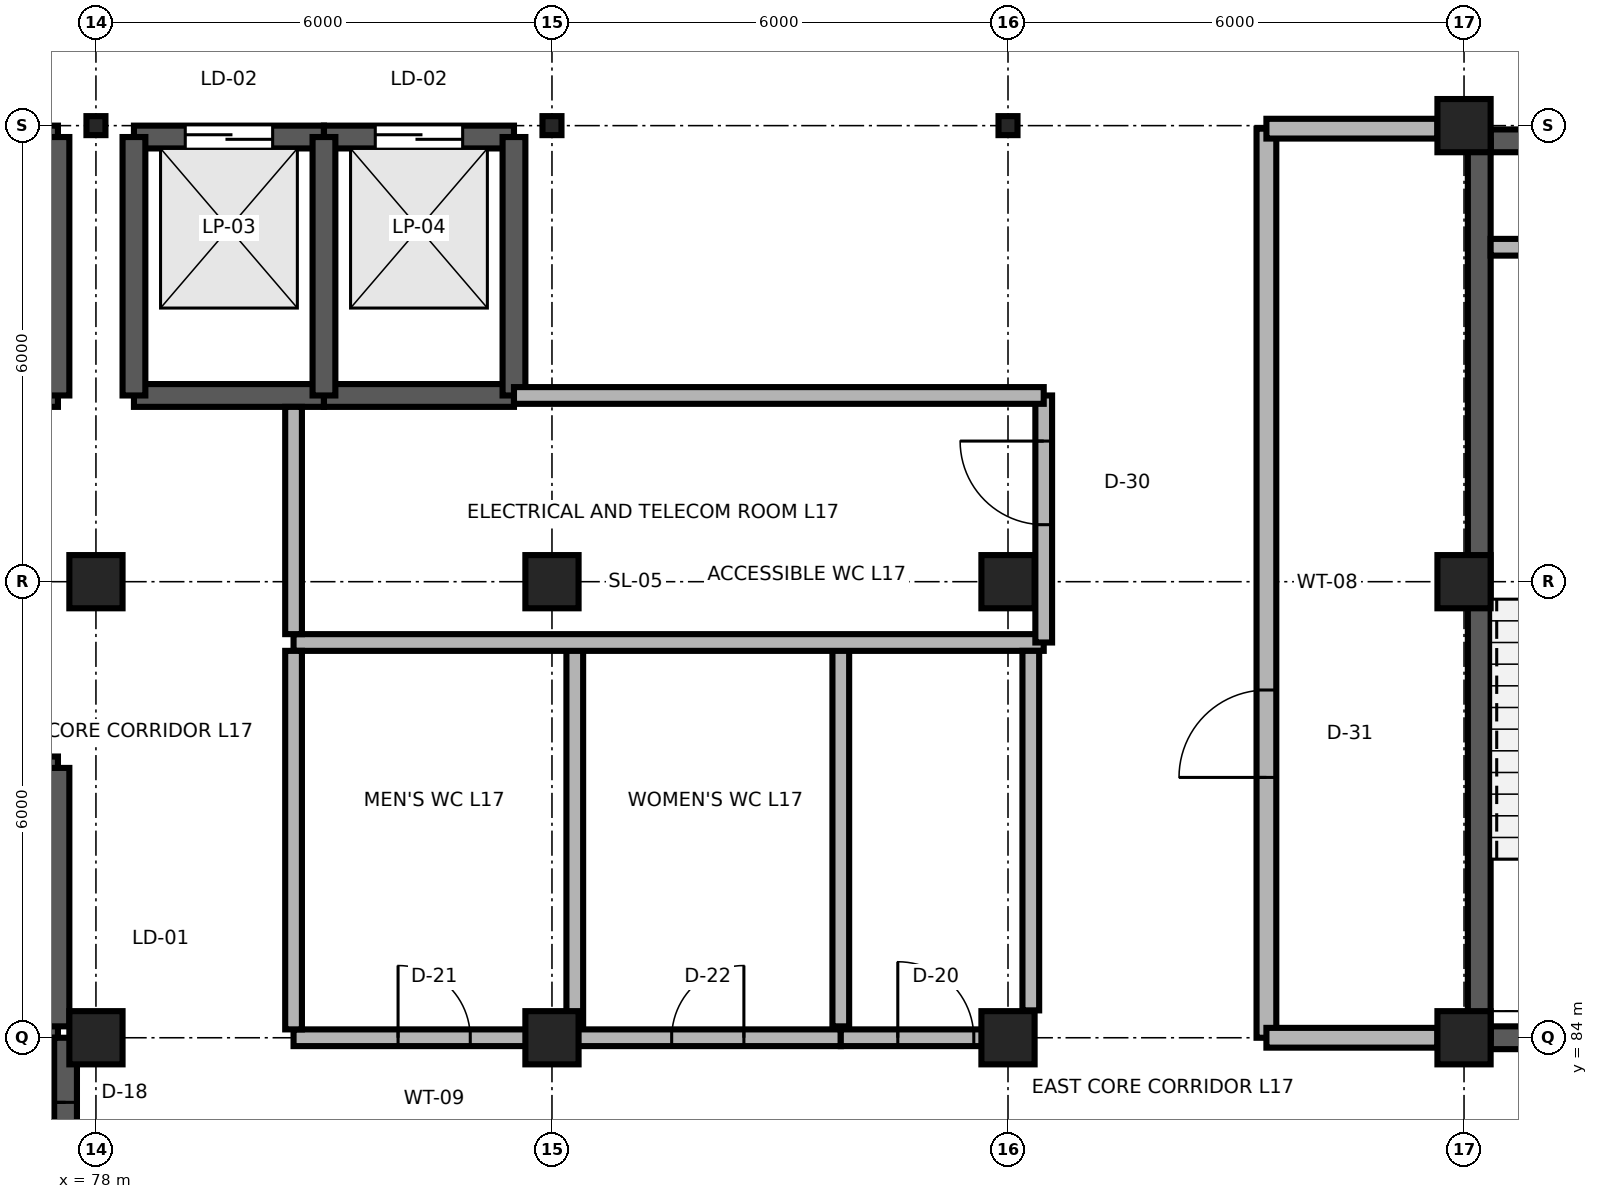
"""IFC4 building model, lengths in metres.
Left out: names, types, materials, properties, quantities, classifications, styles, units other than length and angle.
Written with IfcOpenShell. Run it as: python <this file> out.ifc"""

import sys

from ifc_helpers import new_model, si_unit, direction, frame, frame_2d, origin, origin_2d, place, context, subcontext, project, spatial, rectangle, i_section, extrude, element, fill, save


model = new_model("IFC4")
c1 = context("Model", 3, precision=1e-05, world=origin(), true_north=direction((0.0, 1.0)))
c2 = subcontext(c1, "Body", "Model", "MODEL_VIEW")
j1 = project(units=[si_unit("LENGTHUNIT", "METRE"), si_unit("PLANEANGLEUNIT", "RADIAN")], contexts=[c1])
p1 = place(None, origin())
s1 = spatial("IfcSite", under=j1, at=p1, CompositionType="ELEMENT")
p2 = place(p1, origin())
s2 = spatial("IfcBuilding", under=s1, at=p2, CompositionType="ELEMENT")
p3 = place(p2, frame((0.0, 0.0, 67.8)))
s3 = spatial("IfcBuildingStorey", under=s2, at=p3, CompositionType="ELEMENT", Elevation=67.8)
for number, where, z_axis, x_axis in (
    (1, (78.0, 84.0, 0.0), (0.0, 0.0, 1.0), (1.0, 0.0, 0.0)),
    (2, (84.0, 84.0, 0.0), (0.0, 0.0, 1.0), (1.0, 0.0, 0.0)),
    (3, (90.0, 84.0, 0.0), (0.0, 0.0, 1.0), (1.0, 0.0, 0.0)),
    (4, (96.0, 84.0, 0.0), (0.0, 0.0, 1.0), (1.0, 0.0, 0.0)),
    (5, (78.0, 90.0, 0.0), (0.0, 0.0, 1.0), (1.0, 0.0, 0.0)),
    (6, (84.0, 90.0, 0.0), (0.0, 0.0, 1.0), (1.0, 0.0, 0.0)),
    (7, (90.0, 90.0, 0.0), (0.0, 0.0, 1.0), (1.0, 0.0, 0.0)),
    (8, (96.0, 90.0, 0.0), (0.0, 0.0, 1.0), (1.0, 0.0, 0.0)),
):
    element("IfcColumn", number, at=place(p3, frame(where, z_axis=z_axis, x_axis=x_axis)), inside=s3, PredefinedType="COLUMN", context=c2, shape_type="SweptSolid", body=[
        extrude(rectangle(XDim=0.7, YDim=0.7, at=origin_2d()), origin(), (0.0, 0.0, 1.0), 4.2),
    ])
for number, where, z_axis, x_axis in (
    (9, (78.0, 96.0, 0.0), (0.0, 0.0, 1.0), (1.0, 0.0, 0.0)),
    (10, (84.0, 96.0, 0.0), (0.0, 0.0, 1.0), (1.0, 0.0, 0.0)),
    (11, (90.0, 96.0, 0.0), (0.0, 0.0, 1.0), (1.0, 0.0, 0.0)),
):
    element("IfcColumn", number, at=place(p3, frame(where, z_axis=z_axis, x_axis=x_axis)), inside=s3, PredefinedType="COLUMN", context=c2, shape_type="SweptSolid", body=[
        extrude(i_section(OverallWidth=0.25, OverallDepth=0.25, WebThickness=0.009, FlangeThickness=0.014, FilletRadius=0.016, at=origin_2d()), origin(), (0.0, 0.0, 1.0), 4.2),
    ])
p4 = place(p3, frame((96.0, 96.0, 0.0), z_axis=(0.0, 0.0, 1.0), x_axis=(1.0, 0.0, 0.0)))
e12 = element("IfcColumn", 12, at=p4, inside=s3, PredefinedType="COLUMN", context=c2, shape_type="SweptSolid", body=[
    extrude(rectangle(XDim=0.7, YDim=0.7, at=origin_2d()), origin(), (0.0, 0.0, 1.0), 4.2),
])
p5 = place(p3, frame((96.35, 84.0, 0.0), z_axis=(0.0, 0.0, 1.0), x_axis=(1.0, 0.0, 0.0)))
e13 = element("IfcWall", 13, at=p5, inside=s3, PredefinedType="SHEAR", context=c2, shape_type="SweptSolid", body=[
    extrude(rectangle(XDim=5.3, YDim=0.3, at=frame_2d((2.65, 0.0))), origin(), (0.0, 0.0, 1.0), 3.96),
])
p6 = place(p5, frame((1.975, 0.0, 0.0)))
e14 = element("IfcOpeningElement", 14, at=p6, cuts=e13, PredefinedType="OPENING", context=c2, shape_type="SweptSolid", body=[
    extrude(rectangle(XDim=1.35, YDim=2.2, at=frame_2d((0.675, 1.1))), frame((0.0, 0.165, 0.0), z_axis=(0.0, -1.0, 0.0), x_axis=(1.0, 0.0, 0.0)), (0.0, 0.0, 1.0), 0.33),
])
p7 = place(p3, frame((96.35, 95.8, 0.0), z_axis=(0.0, 0.0, 1.0), x_axis=(1.0, 0.0, 0.0)))
e15 = element("IfcWall", 15, at=p7, inside=s3, PredefinedType="SHEAR", context=c2, shape_type="SweptSolid", body=[
    extrude(rectangle(XDim=5.3, YDim=0.3, at=frame_2d((2.65, 0.0))), origin(), (0.0, 0.0, 1.0), 3.96),
])
p8 = place(p3, frame((96.2, 84.0, 0.0), z_axis=(0.0, 0.0, 1.0), x_axis=(0.0, 1.0, 0.0)))
e16 = element("IfcWall", 16, at=p8, inside=s3, PredefinedType="SHEAR", context=c2, shape_type="SweptSolid", body=[
    extrude(rectangle(XDim=11.8, YDim=0.3, at=frame_2d((5.9, 0.0))), origin(), (0.0, 0.0, 1.0), 3.96),
])
p9 = place(p3, frame((96.35, 94.4, 0.0), z_axis=(0.0, 0.0, 1.0), x_axis=(1.0, 0.0, 0.0)))
e17 = element("IfcWall", 17, at=p9, inside=s3, PredefinedType="PARTITIONING", context=c2, shape_type="SweptSolid", body=[
    extrude(rectangle(XDim=1.1, YDim=0.22, at=frame_2d((0.55, 0.0))), origin(), (0.0, 0.0, 1.0), 3.96),
])
p10 = place(p3, frame((75.0, 84.15, 0.0), z_axis=(0.0, 0.0, 1.0), x_axis=(1.0, 0.0, 0.0)))
e18 = element("IfcWall", 18, at=p10, inside=s3, PredefinedType="SHEAR", context=c2, shape_type="SweptSolid", body=[
    extrude(rectangle(XDim=2.5, YDim=0.3, at=frame_2d((1.25, 0.0))), origin(), (0.0, 0.0, 1.0), 3.96),
])
p11 = place(p10, frame((0.7, 0.0, 0.0)))
e19 = element("IfcOpeningElement", 19, at=p11, cuts=e18, PredefinedType="OPENING", context=c2, shape_type="SweptSolid", body=[
    extrude(rectangle(XDim=1.1, YDim=2.1, at=frame_2d((0.55, 1.05))), frame((0.0, 0.165, 0.0), z_axis=(0.0, -1.0, 0.0), x_axis=(1.0, 0.0, 0.0)), (0.0, 0.0, 1.0), 0.33),
])
p12 = place(p3, frame((75.0, 87.55, 0.0), z_axis=(0.0, 0.0, 1.0), x_axis=(1.0, 0.0, 0.0)))
e20 = element("IfcWall", 20, at=p12, inside=s3, PredefinedType="SHEAR", context=c2, shape_type="SweptSolid", body=[
    extrude(rectangle(XDim=2.5, YDim=0.3, at=frame_2d((1.25, 0.0))), origin(), (0.0, 0.0, 1.0), 3.96),
])
p13 = place(p3, frame((77.5, 84.15, 0.0), z_axis=(0.0, 0.0, 1.0), x_axis=(0.0, 1.0, 0.0)))
e21 = element("IfcWall", 21, at=p13, inside=s3, PredefinedType="SHEAR", context=c2, shape_type="SweptSolid", body=[
    extrude(rectangle(XDim=3.4, YDim=0.3, at=frame_2d((1.7, 0.0))), origin(), (0.0, 0.0, 1.0), 3.96),
])
p14 = place(p3, frame((75.0, 95.85, 0.0), z_axis=(0.0, 0.0, 1.0), x_axis=(1.0, 0.0, 0.0)))
e22 = element("IfcWall", 22, at=p14, inside=s3, PredefinedType="SHEAR", context=c2, shape_type="SweptSolid", body=[
    extrude(rectangle(XDim=2.5, YDim=0.3, at=frame_2d((1.25, 0.0))), origin(), (0.0, 0.0, 1.0), 3.96),
])
p15 = place(p14, frame((0.675, 0.0, 0.0)))
e23 = element("IfcOpeningElement", 23, at=p15, cuts=e22, PredefinedType="OPENING", context=c2, shape_type="SweptSolid", body=[
    extrude(rectangle(XDim=1.15, YDim=2.15, at=frame_2d((0.575, 1.075))), frame((0.0, 0.165, 0.0), z_axis=(0.0, -1.0, 0.0), x_axis=(1.0, 0.0, 0.0)), (0.0, 0.0, 1.0), 0.33),
])
p16 = place(p3, frame((75.0, 92.45, 0.0), z_axis=(0.0, 0.0, 1.0), x_axis=(1.0, 0.0, 0.0)))
e24 = element("IfcWall", 24, at=p16, inside=s3, PredefinedType="SHEAR", context=c2, shape_type="SweptSolid", body=[
    extrude(rectangle(XDim=2.5, YDim=0.3, at=frame_2d((1.25, 0.0))), origin(), (0.0, 0.0, 1.0), 3.96),
])
p17 = place(p3, frame((77.5, 92.45, 0.0), z_axis=(0.0, 0.0, 1.0), x_axis=(0.0, 1.0, 0.0)))
e25 = element("IfcWall", 25, at=p17, inside=s3, PredefinedType="SHEAR", context=c2, shape_type="SweptSolid", body=[
    extrude(rectangle(XDim=3.4, YDim=0.3, at=frame_2d((1.7, 0.0))), origin(), (0.0, 0.0, 1.0), 3.96),
])
p18 = place(p3, frame((78.5, 95.85, 0.0), z_axis=(0.0, 0.0, 1.0), x_axis=(1.0, 0.0, 0.0)))
e26 = element("IfcWall", 26, at=p18, inside=s3, PredefinedType="SHEAR", context=c2, shape_type="SweptSolid", body=[
    extrude(rectangle(XDim=2.5, YDim=0.3, at=frame_2d((1.25, 0.0))), origin(), (0.0, 0.0, 1.0), 3.96),
])
p19 = place(p18, frame((0.675, 0.0, 0.0)))
e27 = element("IfcOpeningElement", 27, at=p19, cuts=e26, PredefinedType="OPENING", context=c2, shape_type="SweptSolid", body=[
    extrude(rectangle(XDim=1.15, YDim=2.15, at=frame_2d((0.575, 1.075))), frame((0.0, 0.165, 0.0), z_axis=(0.0, -1.0, 0.0), x_axis=(1.0, 0.0, 0.0)), (0.0, 0.0, 1.0), 0.33),
])
p20 = place(p3, frame((78.5, 92.45, 0.0), z_axis=(0.0, 0.0, 1.0), x_axis=(1.0, 0.0, 0.0)))
e28 = element("IfcWall", 28, at=p20, inside=s3, PredefinedType="SHEAR", context=c2, shape_type="SweptSolid", body=[
    extrude(rectangle(XDim=2.5, YDim=0.3, at=frame_2d((1.25, 0.0))), origin(), (0.0, 0.0, 1.0), 3.96),
])
p21 = place(p3, frame((78.5, 92.45, 0.0), z_axis=(0.0, 0.0, 1.0), x_axis=(0.0, 1.0, 0.0)))
e29 = element("IfcWall", 29, at=p21, inside=s3, PredefinedType="SHEAR", context=c2, shape_type="SweptSolid", body=[
    extrude(rectangle(XDim=3.4, YDim=0.3, at=frame_2d((1.7, 0.0))), origin(), (0.0, 0.0, 1.0), 3.96),
])
p22 = place(p3, frame((81.0, 95.85, 0.0), z_axis=(0.0, 0.0, 1.0), x_axis=(1.0, 0.0, 0.0)))
e30 = element("IfcWall", 30, at=p22, inside=s3, PredefinedType="SHEAR", context=c2, shape_type="SweptSolid", body=[
    extrude(rectangle(XDim=2.5, YDim=0.3, at=frame_2d((1.25, 0.0))), origin(), (0.0, 0.0, 1.0), 3.96),
])
p23 = place(p22, frame((0.675, 0.0, 0.0)))
e31 = element("IfcOpeningElement", 31, at=p23, cuts=e30, PredefinedType="OPENING", context=c2, shape_type="SweptSolid", body=[
    extrude(rectangle(XDim=1.15, YDim=2.15, at=frame_2d((0.575, 1.075))), frame((0.0, 0.165, 0.0), z_axis=(0.0, -1.0, 0.0), x_axis=(1.0, 0.0, 0.0)), (0.0, 0.0, 1.0), 0.33),
])
p24 = place(p3, frame((81.0, 92.45, 0.0), z_axis=(0.0, 0.0, 1.0), x_axis=(1.0, 0.0, 0.0)))
e32 = element("IfcWall", 32, at=p24, inside=s3, PredefinedType="SHEAR", context=c2, shape_type="SweptSolid", body=[
    extrude(rectangle(XDim=2.5, YDim=0.3, at=frame_2d((1.25, 0.0))), origin(), (0.0, 0.0, 1.0), 3.96),
])
for number, where, z_axis, x_axis in (
    (33, (81.0, 92.45, 0.0), (0.0, 0.0, 1.0), (0.0, 1.0, 0.0)),
    (34, (83.5, 92.45, 0.0), (0.0, 0.0, 1.0), (0.0, 1.0, 0.0)),
):
    element("IfcWall", number, at=place(p3, frame(where, z_axis=z_axis, x_axis=x_axis)), inside=s3, PredefinedType="SHEAR", context=c2, shape_type="SweptSolid", body=[
        extrude(rectangle(XDim=3.4, YDim=0.3, at=frame_2d((1.7, 0.0))), origin(), (0.0, 0.0, 1.0), 3.96),
    ])
p25 = place(p3, frame((93.4, 84.0, 0.0), z_axis=(0.0, 0.0, 1.0), x_axis=(0.0, 1.0, 0.0)))
e35 = element("IfcWall", 35, at=p25, inside=s3, PredefinedType="PARTITIONING", context=c2, shape_type="SweptSolid", body=[
    extrude(rectangle(XDim=11.96, YDim=0.26, at=frame_2d((5.98, 0.0))), origin(), (0.0, 0.0, 1.0), 3.96),
])
p26 = place(p25, frame((3.425, 0.0, 0.0)))
e36 = element("IfcOpeningElement", 36, at=p26, cuts=e35, PredefinedType="OPENING", context=c2, shape_type="SweptSolid", body=[
    extrude(rectangle(XDim=1.15, YDim=2.2, at=frame_2d((0.575, 1.1))), frame((0.0, 0.145, 0.0), z_axis=(0.0, -1.0, 0.0), x_axis=(1.0, 0.0, 0.0)), (0.0, 0.0, 1.0), 0.29),
])
for number, where, z_axis, x_axis in (
    (37, (93.4, 84.0, 0.0), (0.0, 0.0, 1.0), (1.0, 0.0, 0.0)),
    (38, (93.4, 95.96, 0.0), (0.0, 0.0, 1.0), (1.0, 0.0, 0.0)),
):
    element("IfcWall", number, at=place(p3, frame(where, z_axis=z_axis, x_axis=x_axis)), inside=s3, PredefinedType="PARTITIONING", context=c2, shape_type="SweptSolid", body=[
        extrude(rectangle(XDim=2.25, YDim=0.26, at=frame_2d((1.125, 0.0))), origin(), (0.0, 0.0, 1.0), 3.716),
    ])
p27 = place(p3, frame((77.6, 81.0, 0.0), z_axis=(0.0, 0.0, 1.0), x_axis=(0.0, 1.0, 0.0)))
e39 = element("IfcWall", 39, at=p27, inside=s3, PredefinedType="SHEAR", context=c2, shape_type="SweptSolid", body=[
    extrude(rectangle(XDim=3.0, YDim=0.3, at=frame_2d((1.5, 0.0))), origin(), (0.0, 0.0, 1.0), 3.96),
])
p28 = place(p27, frame((0.85, 0.0, 0.0)))
e40 = element("IfcOpeningElement", 40, at=p28, cuts=e39, PredefinedType="OPENING", context=c2, shape_type="SweptSolid", body=[
    extrude(rectangle(XDim=1.3, YDim=2.2, at=frame_2d((0.65, 1.1))), frame((0.0, 0.165, 0.0), z_axis=(0.0, -1.0, 0.0), x_axis=(1.0, 0.0, 0.0)), (0.0, 0.0, 1.0), 0.33),
])
p29 = place(p3, frame((80.6, 84.0, 0.0), z_axis=(0.0, 0.0, 1.0), x_axis=(1.0, 0.0, 0.0)))
e41 = element("IfcWall", 41, at=p29, inside=s3, PredefinedType="PARTITIONING", context=c2, shape_type="SweptSolid", body=[
    extrude(rectangle(XDim=3.7, YDim=0.22, at=frame_2d((1.85, 0.0))), origin(), (0.0, 0.0, 1.0), 3.716),
])
p30 = place(p29, frame((1.375, 0.0, 0.0)))
e42 = element("IfcOpeningElement", 42, at=p30, cuts=e41, PredefinedType="OPENING", context=c2, shape_type="SweptSolid", body=[
    extrude(rectangle(XDim=0.95, YDim=2.15, at=frame_2d((0.475, 1.075))), frame((0.0, 0.125, 0.0), z_axis=(0.0, -1.0, 0.0), x_axis=(1.0, 0.0, 0.0)), (0.0, 0.0, 1.0), 0.25),
])
p31 = place(p3, frame((84.3, 84.0, 0.0), z_axis=(0.0, 0.0, 1.0), x_axis=(1.0, 0.0, 0.0)))
e43 = element("IfcWall", 43, at=p31, inside=s3, PredefinedType="PARTITIONING", context=c2, shape_type="SweptSolid", body=[
    extrude(rectangle(XDim=3.5, YDim=0.22, at=frame_2d((1.75, 0.0))), origin(), (0.0, 0.0, 1.0), 3.716),
])
p32 = place(p31, frame((1.275, 0.0, 0.0)))
e44 = element("IfcOpeningElement", 44, at=p32, cuts=e43, PredefinedType="OPENING", context=c2, shape_type="SweptSolid", body=[
    extrude(rectangle(XDim=0.95, YDim=2.1, at=frame_2d((0.475, 1.05))), frame((0.0, 0.125, 0.0), z_axis=(0.0, -1.0, 0.0), x_axis=(1.0, 0.0, 0.0)), (0.0, 0.0, 1.0), 0.25),
])
p33 = place(p3, frame((87.8, 84.0, 0.0), z_axis=(0.0, 0.0, 1.0), x_axis=(1.0, 0.0, 0.0)))
e45 = element("IfcWall", 45, at=p33, inside=s3, PredefinedType="PARTITIONING", context=c2, shape_type="SweptSolid", body=[
    extrude(rectangle(XDim=2.5, YDim=0.22, at=frame_2d((1.25, 0.0))), origin(), (0.0, 0.0, 1.0), 3.716),
])
p34 = place(p33, frame((0.75, 0.0, 0.0)))
e46 = element("IfcOpeningElement", 46, at=p34, cuts=e45, PredefinedType="OPENING", context=c2, shape_type="SweptSolid", body=[
    extrude(rectangle(XDim=1.0, YDim=2.15, at=frame_2d((0.5, 1.075))), frame((0.0, 0.125, 0.0), z_axis=(0.0, -1.0, 0.0), x_axis=(1.0, 0.0, 0.0)), (0.0, 0.0, 1.0), 0.25),
])
for number, where, z_axis, x_axis in (
    (47, (84.3, 84.15, 0.0), (0.0, 0.0, 1.0), (0.0, 1.0, 0.0)),
    (48, (87.8, 84.15, 0.0), (0.0, 0.0, 1.0), (0.0, 1.0, 0.0)),
):
    element("IfcWall", number, at=place(p3, frame(where, z_axis=z_axis, x_axis=x_axis)), inside=s3, PredefinedType="PARTITIONING", context=c2, shape_type="SweptSolid", body=[
        extrude(rectangle(XDim=5.0, YDim=0.22, at=frame_2d((2.5, 0.0))), origin(), (0.0, 0.0, 1.0), 3.96),
    ])
p35 = place(p3, frame((80.6, 89.2, 0.0), z_axis=(0.0, 0.0, 1.0), x_axis=(1.0, 0.0, 0.0)))
e49 = element("IfcWall", 49, at=p35, inside=s3, PredefinedType="PARTITIONING", context=c2, shape_type="SweptSolid", body=[
    extrude(rectangle(XDim=9.87, YDim=0.22, at=frame_2d((4.935, 0.0))), origin(), (0.0, 0.0, 1.0), 3.96),
])
p36 = place(p3, frame((90.47, 89.2, 0.0), z_axis=(0.0, 0.0, 1.0), x_axis=(0.0, 1.0, 0.0)))
e50 = element("IfcWall", 50, at=p36, inside=s3, PredefinedType="PARTITIONING", context=c2, shape_type="SweptSolid", body=[
    extrude(rectangle(XDim=3.25, YDim=0.22, at=frame_2d((1.625, 0.0))), origin(), (0.0, 0.0, 1.0), 3.96),
])
p37 = place(p36, frame((1.55, 0.0, 0.0)))
e51 = element("IfcOpeningElement", 51, at=p37, cuts=e50, PredefinedType="OPENING", context=c2, shape_type="SweptSolid", body=[
    extrude(rectangle(XDim=1.1, YDim=2.15, at=frame_2d((0.55, 1.075))), frame((0.0, 0.125, 0.0), z_axis=(0.0, -1.0, 0.0), x_axis=(1.0, 0.0, 0.0)), (0.0, 0.0, 1.0), 0.25),
])
p38 = place(p3, frame((80.6, 84.11, 0.0), z_axis=(0.0, 0.0, 1.0), x_axis=(0.0, 1.0, 0.0)))
e52 = element("IfcWall", 52, at=p38, inside=s3, PredefinedType="PARTITIONING", context=c2, shape_type="SweptSolid", body=[
    extrude(rectangle(XDim=4.98, YDim=0.22, at=frame_2d((2.49, 0.0))), origin(), (0.0, 0.0, 1.0), 3.96),
])
p39 = place(p3, frame((90.3, 84.36, 0.0), z_axis=(0.0, 0.0, 1.0), x_axis=(0.0, 1.0, 0.0)))
e53 = element("IfcWall", 53, at=p39, inside=s3, PredefinedType="PARTITIONING", context=c2, shape_type="SweptSolid", body=[
    extrude(rectangle(XDim=4.73, YDim=0.22, at=frame_2d((2.365, 0.0))), origin(), (0.0, 0.0, 1.0), 3.96),
])
p40 = place(p3, frame((80.6, 89.31, 0.0), z_axis=(0.0, 0.0, 1.0), x_axis=(0.0, 1.0, 0.0)))
e54 = element("IfcWall", 54, at=p40, inside=s3, PredefinedType="PARTITIONING", context=c2, shape_type="SweptSolid", body=[
    extrude(rectangle(XDim=2.99, YDim=0.22, at=frame_2d((1.495, 0.0))), origin(), (0.0, 0.0, 1.0), 3.96),
])
p41 = place(p3, frame((83.5, 92.45, 0.0), z_axis=(0.0, 0.0, 1.0), x_axis=(1.0, 0.0, 0.0)))
e55 = element("IfcWall", 55, at=p41, inside=s3, PredefinedType="PARTITIONING", context=c2, shape_type="SweptSolid", body=[
    extrude(rectangle(XDim=6.97, YDim=0.22, at=frame_2d((3.485, 0.0))), origin(), (0.0, 0.0, 1.0), 3.96),
])
p42 = place(p19, origin())
e56 = element("IfcDoor", 56, at=p42, inside=s3, OperationType="DOUBLE_DOOR_SLIDING", PredefinedType="DOOR", context=c2, shape_type="SweptSolid", body=[
    extrude(rectangle(XDim=1.15, YDim=2.15, at=frame_2d((0.575, 1.075))), frame((0.0, 0.025, 0.0), z_axis=(0.0, -1.0, 0.0), x_axis=(1.0, 0.0, 0.0)), (0.0, 0.0, 1.0), 0.05),
])
fill(e27, e56)
p43 = place(p23, origin())
e57 = element("IfcDoor", 57, at=p43, inside=s3, OperationType="DOUBLE_DOOR_SLIDING", PredefinedType="DOOR", context=c2, shape_type="SweptSolid", body=[
    extrude(rectangle(XDim=1.15, YDim=2.15, at=frame_2d((0.575, 1.075))), frame((0.0, 0.025, 0.0), z_axis=(0.0, -1.0, 0.0), x_axis=(1.0, 0.0, 0.0)), (0.0, 0.0, 1.0), 0.05),
])
fill(e31, e57)
p44 = place(p26, origin())
e58 = element("IfcDoor", 58, at=p44, inside=s3, OperationType="SINGLE_SWING_LEFT", PredefinedType="DOOR", context=c2, shape_type="SweptSolid", body=[
    extrude(rectangle(XDim=1.15, YDim=2.2, at=frame_2d((0.575, 1.1))), frame((0.0, 0.025, 0.0), z_axis=(0.0, -1.0, 0.0), x_axis=(1.0, 0.0, 0.0)), (0.0, 0.0, 1.0), 0.05),
])
fill(e36, e58)
p45 = place(p28, origin())
e59 = element("IfcDoor", 59, at=p45, inside=s3, OperationType="SINGLE_SWING_RIGHT", PredefinedType="DOOR", context=c2, shape_type="SweptSolid", body=[
    extrude(rectangle(XDim=1.3, YDim=2.2, at=frame_2d((0.65, 1.1))), frame((0.0, 0.025, 0.0), z_axis=(0.0, -1.0, 0.0), x_axis=(1.0, 0.0, 0.0)), (0.0, 0.0, 1.0), 0.05),
])
fill(e40, e59)
p46 = place(p30, origin())
e60 = element("IfcDoor", 60, at=p46, inside=s3, OperationType="SINGLE_SWING_LEFT", PredefinedType="DOOR", context=c2, shape_type="SweptSolid", body=[
    extrude(rectangle(XDim=0.95, YDim=2.15, at=frame_2d((0.475, 1.075))), frame((0.0, 0.025, 0.0), z_axis=(0.0, -1.0, 0.0), x_axis=(1.0, 0.0, 0.0)), (0.0, 0.0, 1.0), 0.05),
])
fill(e42, e60)
p47 = place(p32, origin())
e61 = element("IfcDoor", 61, at=p47, inside=s3, OperationType="SINGLE_SWING_RIGHT", PredefinedType="DOOR", context=c2, shape_type="SweptSolid", body=[
    extrude(rectangle(XDim=0.95, YDim=2.1, at=frame_2d((0.475, 1.05))), frame((0.0, 0.025, 0.0), z_axis=(0.0, -1.0, 0.0), x_axis=(1.0, 0.0, 0.0)), (0.0, 0.0, 1.0), 0.05),
])
fill(e44, e61)
p48 = place(p34, origin())
e62 = element("IfcDoor", 62, at=p48, inside=s3, OperationType="SINGLE_SWING_LEFT", PredefinedType="DOOR", context=c2, shape_type="SweptSolid", body=[
    extrude(rectangle(XDim=1.0, YDim=2.15, at=frame_2d((0.5, 1.075))), frame((0.0, 0.025, 0.0), z_axis=(0.0, -1.0, 0.0), x_axis=(1.0, 0.0, 0.0)), (0.0, 0.0, 1.0), 0.05),
])
fill(e46, e62)
p49 = place(p37, origin())
e63 = element("IfcDoor", 63, at=p49, inside=s3, OperationType="SINGLE_SWING_RIGHT", PredefinedType="DOOR", context=c2, shape_type="SweptSolid", body=[
    extrude(rectangle(XDim=1.1, YDim=2.15, at=frame_2d((0.55, 1.075))), frame((0.0, 0.025, 0.0), z_axis=(0.0, -1.0, 0.0), x_axis=(1.0, 0.0, 0.0)), (0.0, 0.0, 1.0), 0.05),
])
fill(e51, e63)
save(model, sys.argv[1])
